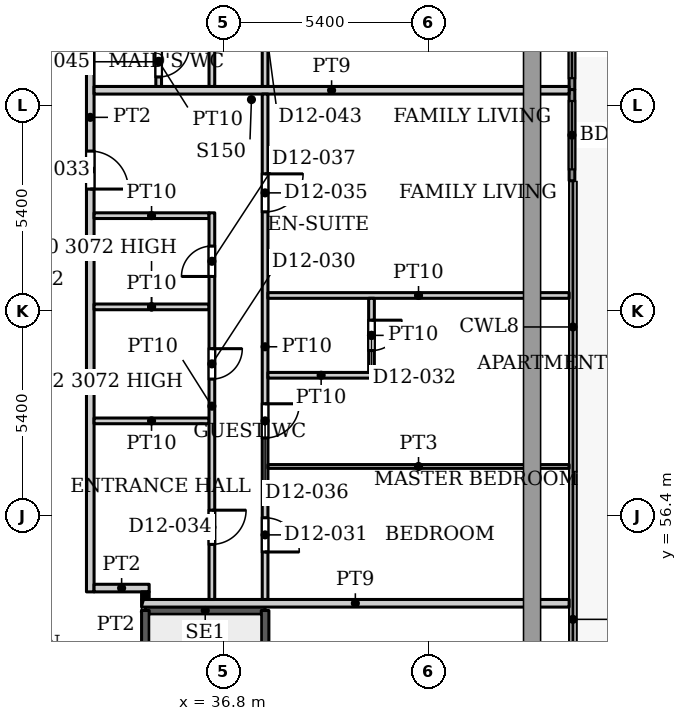
"""IFC4 building model, lengths in metres.
Left out: names, types, materials, properties, quantities, classifications, styles, units other than length and angle.
Written with IfcOpenShell. Run it as: python <this file> out.ifc"""

import sys

from ifc_helpers import new_model, si_unit, direction, frame, frame_2d, origin, place, context, subcontext, project, spatial, rectangle, extrude, source, transform, mapped, element, fill, save


model = new_model("IFC4")
c1 = context("Model", 3, precision=1e-05, world=origin(), true_north=direction((0.0, 1.0)))
c2 = subcontext(c1, "Body", "Model", "MODEL_VIEW")
j1 = project(units=[si_unit("LENGTHUNIT", "METRE"), si_unit("PLANEANGLEUNIT", "RADIAN")], contexts=[c1])
p1 = place(None, origin())
s1 = spatial("IfcSite", under=j1, at=p1, CompositionType="ELEMENT")
p2 = place(p1, origin())
s2 = spatial("IfcBuilding", under=s1, at=p2, CompositionType="ELEMENT")
p3 = place(p2, frame((0.0, 0.0, 53.9)))
s3 = spatial("IfcBuildingStorey", under=s2, at=p3, CompositionType="ELEMENT", Elevation=53.9)
p4 = place(p3, frame((45.975, 70.018, 0.0), z_axis=(0.0, 0.0, 1.0), x_axis=(0.0, -1.0, 0.0)))
e1 = element("IfcWall", 1, at=p4, inside=s3, PredefinedType="SOLIDWALL", context=c2, shape_type="SweptSolid", body=[
    extrude(rectangle(XDim=2.4, YDim=0.15, at=frame_2d((1.2, 0.0))), origin(), (0.0, 0.0, 1.0), 3.75),
])
p5 = place(p4, frame((0.3, 0.0, 0.0)))
e2 = element("IfcOpeningElement", 2, at=p5, cuts=e1, PredefinedType="OPENING", context=c2, shape_type="SweptSolid", body=[
    extrude(rectangle(XDim=1.8, YDim=2.4, at=frame_2d((0.9, 1.2))), frame((0.0, 0.085, 0.0), z_axis=(0.0, -1.0, 0.0), x_axis=(1.0, 0.0, 0.0)), (0.0, 0.0, 1.0), 0.17),
])
p6 = place(p3, frame((45.975, 67.618, 0.0), z_axis=(0.0, 0.0, 1.0), x_axis=(0.0, -1.0, 0.0)))
e3 = element("IfcWall", 3, at=p6, inside=s3, PredefinedType="SOLIDWALL", context=c2, shape_type="SweptSolid", body=[
    extrude(rectangle(XDim=2.4, YDim=0.15, at=frame_2d((1.2, 0.0))), origin(), (0.0, 0.0, 1.0), 3.75),
])
p7 = place(p6, frame((0.3, 0.0, 0.0)))
e4 = element("IfcOpeningElement", 4, at=p7, cuts=e3, PredefinedType="OPENING", context=c2, shape_type="SweptSolid", body=[
    extrude(rectangle(XDim=1.8, YDim=2.4, at=frame_2d((0.9, 1.2))), frame((0.0, 0.085, 0.0), z_axis=(0.0, -1.0, 0.0), x_axis=(1.0, 0.0, 0.0)), (0.0, 0.0, 1.0), 0.17),
])
p8 = place(p3, frame((34.75, 53.91, 0.0), z_axis=(0.0, 0.0, 1.0), x_axis=(1.0, 0.0, 0.0)))
e5 = element("IfcWall", 5, at=p8, inside=s3, PredefinedType="SHEAR", context=c2, shape_type="SweptSolid", body=[
    extrude(rectangle(XDim=3.15, YDim=0.2, at=frame_2d((1.575, 0.0))), origin(), (0.0, 0.0, 1.0), 3.9),
])
p9 = place(p3, frame((34.75, 47.5, 0.0), z_axis=(0.0, 0.0, 1.0), x_axis=(0.0, 1.0, 0.0)))
e6 = element("IfcWall", 6, at=p9, inside=s3, PredefinedType="SHEAR", context=c2, shape_type="SweptSolid", body=[
    extrude(rectangle(XDim=6.41, YDim=0.2, at=frame_2d((3.205, 0.0))), origin(), (0.0, 0.0, 1.0), 3.9),
])
p10 = place(p3, frame((37.9, 44.75, 0.0), z_axis=(0.0, 0.0, 1.0), x_axis=(0.0, 1.0, 0.0)))
e7 = element("IfcWall", 7, at=p10, inside=s3, PredefinedType="SHEAR", context=c2, shape_type="SweptSolid", body=[
    extrude(rectangle(XDim=9.16, YDim=0.2, at=frame_2d((4.58, 0.0))), origin(), (0.0, 0.0, 1.0), 3.9),
])
p11 = place(p3, frame((33.3, 54.4, 0.0), z_axis=(0.0, 0.0, 1.0), x_axis=(0.0, 1.0, 0.0)))
e8 = element("IfcWall", 8, at=p11, inside=s3, PredefinedType="PARTITIONING", context=c2, shape_type="SweptSolid", body=[
    extrude(rectangle(XDim=24.975, YDim=0.2, at=frame_2d((12.488, 0.0))), origin(), (0.0, 0.0, 1.0), 3.6),
])
p12 = place(p11, frame((10.6, 0.0, 0.0)))
e9 = element("IfcOpeningElement", 9, at=p12, cuts=e8, PredefinedType="OPENING", context=c2, shape_type="SweptSolid", body=[
    extrude(rectangle(XDim=1.0, YDim=2.1, at=frame_2d((0.5, 1.05))), frame((0.0, 0.11, 0.0), z_axis=(0.0, -1.0, 0.0), x_axis=(1.0, 0.0, 0.0)), (0.0, 0.0, 1.0), 0.22),
])
p13 = place(p11, frame((22.0, 0.0, 0.0)))
e10 = element("IfcOpeningElement", 10, at=p13, cuts=e8, PredefinedType="OPENING", context=c2, shape_type="SweptSolid", body=[
    extrude(rectangle(XDim=1.0, YDim=2.1, at=frame_2d((0.5, 1.05))), frame((0.0, 0.11, 0.0), z_axis=(0.0, -1.0, 0.0), x_axis=(1.0, 0.0, 0.0)), (0.0, 0.0, 1.0), 0.22),
])
p14 = place(p3, frame((33.4, 54.5, 0.0), z_axis=(0.0, 0.0, 1.0), x_axis=(1.0, 0.0, 0.0)))
e11 = element("IfcWall", 11, at=p14, inside=s3, PredefinedType="PARTITIONING", context=c2, shape_type="SweptSolid", body=[
    extrude(rectangle(XDim=1.45, YDim=0.2, at=frame_2d((0.725, 0.0))), origin(), (0.0, 0.0, 1.0), 3.6),
])
p15 = place(p3, frame((33.4, 58.9, 0.0), z_axis=(0.0, 0.0, 1.0), x_axis=(1.0, 0.0, 0.0)))
e12 = element("IfcWall", 12, at=p15, inside=s3, PredefinedType="PARTITIONING", context=c2, shape_type="SweptSolid", body=[
    extrude(rectangle(XDim=3.025, YDim=0.15, at=frame_2d((1.513, 0.0))), origin(), (0.0, 0.0, 1.0), 3.6),
])
p16 = place(p3, frame((33.4, 61.9, 0.0), z_axis=(0.0, 0.0, 1.0), x_axis=(1.0, 0.0, 0.0)))
e13 = element("IfcWall", 13, at=p16, inside=s3, PredefinedType="PARTITIONING", context=c2, shape_type="SweptSolid", body=[
    extrude(rectangle(XDim=3.025, YDim=0.15, at=frame_2d((1.513, 0.0))), origin(), (0.0, 0.0, 1.0), 3.072),
])
p17 = place(p3, frame((33.4, 64.3, 0.0), z_axis=(0.0, 0.0, 1.0), x_axis=(1.0, 0.0, 0.0)))
e14 = element("IfcWall", 14, at=p17, inside=s3, PredefinedType="PARTITIONING", context=c2, shape_type="SweptSolid", body=[
    extrude(rectangle(XDim=3.025, YDim=0.15, at=frame_2d((1.513, 0.0))), origin(), (0.0, 0.0, 1.0), 3.6),
])
p18 = place(p3, frame((33.4, 67.6, 0.0), z_axis=(0.0, 0.0, 1.0), x_axis=(1.0, 0.0, 0.0)))
e15 = element("IfcWall", 15, at=p18, inside=s3, PredefinedType="PARTITIONING", context=c2, shape_type="SweptSolid", body=[
    extrude(rectangle(XDim=12.5, YDim=0.2, at=frame_2d((6.25, 0.0))), origin(), (0.0, 0.0, 1.0), 3.6),
])
p19 = place(p3, frame((34.65, 54.1, 0.0), z_axis=(0.0, 0.0, 1.0), x_axis=(1.0, 0.0, 0.0)))
e16 = element("IfcWall", 16, at=p19, inside=s3, PredefinedType="PARTITIONING", context=c2, shape_type="SweptSolid", body=[
    extrude(rectangle(XDim=11.25, YDim=0.2, at=frame_2d((5.625, 0.0))), origin(), (0.0, 0.0, 1.0), 3.6),
])
p20 = place(p3, frame((34.75, 54.2, 0.0), z_axis=(0.0, 0.0, 1.0), x_axis=(0.0, 1.0, 0.0)))
e17 = element("IfcWall", 17, at=p20, inside=s3, PredefinedType="PARTITIONING", context=c2, shape_type="SweptSolid", body=[
    extrude(rectangle(XDim=0.2, YDim=0.2, at=frame_2d((0.1, 0.0))), origin(), (0.0, 0.0, 1.0), 3.6),
])
p21 = place(p3, frame((35.1, 67.7, 0.0), z_axis=(0.0, 0.0, 1.0), x_axis=(0.0, 1.0, 0.0)))
e18 = element("IfcWall", 18, at=p21, inside=s3, PredefinedType="PARTITIONING", context=c2, shape_type="SweptSolid", body=[
    extrude(rectangle(XDim=1.325, YDim=0.15, at=frame_2d((0.663, 0.0))), origin(), (0.0, 0.0, 1.0), 3.6),
])
p22 = place(p21, frame((0.25, 0.0, 0.0)))
e19 = element("IfcOpeningElement", 19, at=p22, cuts=e18, PredefinedType="OPENING", context=c2, shape_type="SweptSolid", body=[
    extrude(rectangle(XDim=0.8, YDim=2.1, at=frame_2d((0.4, 1.05))), frame((0.0, 0.085, 0.0), z_axis=(0.0, -1.0, 0.0), x_axis=(1.0, 0.0, 0.0)), (0.0, 0.0, 1.0), 0.17),
])
p23 = place(p3, frame((36.5, 54.2, 0.0), z_axis=(0.0, 0.0, 1.0), x_axis=(0.0, 1.0, 0.0)))
e20 = element("IfcWall", 20, at=p23, inside=s3, PredefinedType="PARTITIONING", context=c2, shape_type="SweptSolid", body=[
    extrude(rectangle(XDim=10.175, YDim=0.15, at=frame_2d((5.087, 0.0))), origin(), (0.0, 0.0, 1.0), 3.6),
])
p24 = place(p23, frame((5.8, 0.0, 0.0)))
e21 = element("IfcOpeningElement", 21, at=p24, cuts=e20, PredefinedType="OPENING", context=c2, shape_type="SweptSolid", body=[
    extrude(rectangle(XDim=0.8, YDim=2.1, at=frame_2d((0.4, 1.05))), frame((0.0, 0.085, 0.0), z_axis=(0.0, -1.0, 0.0), x_axis=(1.0, 0.0, 0.0)), (0.0, 0.0, 1.0), 0.17),
])
p25 = place(p23, frame((1.45, 0.0, 0.0)))
e22 = element("IfcOpeningElement", 22, at=p25, cuts=e20, PredefinedType="OPENING", context=c2, shape_type="SweptSolid", body=[
    extrude(rectangle(XDim=0.9, YDim=2.1, at=frame_2d((0.45, 1.05))), frame((0.0, 0.085, 0.0), z_axis=(0.0, -1.0, 0.0), x_axis=(1.0, 0.0, 0.0)), (0.0, 0.0, 1.0), 0.17),
])
p26 = place(p23, frame((8.5, 0.0, 0.0)))
e23 = element("IfcOpeningElement", 23, at=p26, cuts=e20, PredefinedType="OPENING", context=c2, shape_type="SweptSolid", body=[
    extrude(rectangle(XDim=0.8, YDim=2.1, at=frame_2d((0.4, 1.05))), frame((0.0, 0.085, 0.0), z_axis=(0.0, -1.0, 0.0), x_axis=(1.0, 0.0, 0.0)), (0.0, 0.0, 1.0), 0.17),
])
p27 = place(p3, frame((36.5, 67.7, 0.0), z_axis=(0.0, 0.0, 1.0), x_axis=(0.0, 1.0, 0.0)))
e24 = element("IfcWall", 24, at=p27, inside=s3, PredefinedType="PARTITIONING", context=c2, shape_type="SweptSolid", body=[
    extrude(rectangle(XDim=8.375, YDim=0.15, at=frame_2d((4.188, 0.0))), origin(), (0.0, 0.0, 1.0), 3.6),
])
p28 = place(p27, frame((6.85, 0.0, 0.0)))
e25 = element("IfcOpeningElement", 25, at=p28, cuts=e24, PredefinedType="OPENING", context=c2, shape_type="SweptSolid", body=[
    extrude(rectangle(XDim=0.8, YDim=2.1, at=frame_2d((0.4, 1.05))), frame((0.0, 0.085, 0.0), z_axis=(0.0, -1.0, 0.0), x_axis=(1.0, 0.0, 0.0)), (0.0, 0.0, 1.0), 0.17),
])
p29 = place(p27, frame((4.25, 0.0, 0.0)))
e26 = element("IfcOpeningElement", 26, at=p29, cuts=e24, PredefinedType="OPENING", context=c2, shape_type="SweptSolid", body=[
    extrude(rectangle(XDim=0.9, YDim=2.1, at=frame_2d((0.45, 1.05))), frame((0.0, 0.085, 0.0), z_axis=(0.0, -1.0, 0.0), x_axis=(1.0, 0.0, 0.0)), (0.0, 0.0, 1.0), 0.17),
])
p30 = place(p27, frame((1.9, 0.0, 0.0)))
e27 = element("IfcOpeningElement", 27, at=p30, cuts=e24, PredefinedType="OPENING", context=c2, shape_type="SweptSolid", body=[
    extrude(rectangle(XDim=0.8, YDim=2.1, at=frame_2d((0.4, 1.05))), frame((0.0, 0.085, 0.0), z_axis=(0.0, -1.0, 0.0), x_axis=(1.0, 0.0, 0.0)), (0.0, 0.0, 1.0), 0.17),
])
p31 = place(p3, frame((37.9, 54.2, 0.0), z_axis=(0.0, 0.0, 1.0), x_axis=(0.0, 1.0, 0.0)))
e28 = element("IfcWall", 28, at=p31, inside=s3, PredefinedType="PARTITIONING", context=c2, shape_type="SweptSolid", body=[
    extrude(rectangle(XDim=13.3, YDim=0.15, at=frame_2d((6.65, 0.0))), origin(), (0.0, 0.0, 1.0), 3.6),
])
p32 = place(p31, frame((1.25, 0.0, 0.0)))
e29 = element("IfcOpeningElement", 29, at=p32, cuts=e28, PredefinedType="OPENING", context=c2, shape_type="SweptSolid", body=[
    extrude(rectangle(XDim=0.9, YDim=2.1, at=frame_2d((0.45, 1.05))), frame((0.0, 0.085, 0.0), z_axis=(0.0, -1.0, 0.0), x_axis=(1.0, 0.0, 0.0)), (0.0, 0.0, 1.0), 0.17),
])
p33 = place(p31, frame((10.2, 0.0, 0.0)))
e30 = element("IfcOpeningElement", 30, at=p33, cuts=e28, PredefinedType="OPENING", context=c2, shape_type="SweptSolid", body=[
    extrude(rectangle(XDim=1.0, YDim=2.1, at=frame_2d((0.5, 1.05))), frame((0.0, 0.085, 0.0), z_axis=(0.0, -1.0, 0.0), x_axis=(1.0, 0.0, 0.0)), (0.0, 0.0, 1.0), 0.17),
])
p34 = place(p31, frame((4.25, 0.0, 0.0)))
e31 = element("IfcOpeningElement", 31, at=p34, cuts=e28, PredefinedType="OPENING", context=c2, shape_type="SweptSolid", body=[
    extrude(rectangle(XDim=0.9, YDim=2.1, at=frame_2d((0.45, 1.05))), frame((0.0, 0.085, 0.0), z_axis=(0.0, -1.0, 0.0), x_axis=(1.0, 0.0, 0.0)), (0.0, 0.0, 1.0), 0.17),
])
p35 = place(p3, frame((37.9, 67.7, 0.0), z_axis=(0.0, 0.0, 1.0), x_axis=(0.0, 1.0, 0.0)))
e32 = element("IfcWall", 32, at=p35, inside=s3, PredefinedType="PARTITIONING", context=c2, shape_type="SweptSolid", body=[
    extrude(rectangle(XDim=11.525, YDim=0.15, at=frame_2d((5.763, 0.0))), origin(), (0.0, 0.0, 1.0), 3.6),
])
p36 = place(p35, frame((9.35, 0.0, 0.0)))
e33 = element("IfcOpeningElement", 33, at=p36, cuts=e32, PredefinedType="OPENING", context=c2, shape_type="SweptSolid", body=[
    extrude(rectangle(XDim=0.9, YDim=2.1, at=frame_2d((0.45, 1.05))), frame((0.0, 0.085, 0.0), z_axis=(0.0, -1.0, 0.0), x_axis=(1.0, 0.0, 0.0)), (0.0, 0.0, 1.0), 0.17),
])
p37 = place(p35, frame((1.2, 0.0, 0.0)))
e34 = element("IfcOpeningElement", 34, at=p37, cuts=e32, PredefinedType="OPENING", context=c2, shape_type="SweptSolid", body=[
    extrude(rectangle(XDim=1.0, YDim=2.1, at=frame_2d((0.5, 1.05))), frame((0.0, 0.085, 0.0), z_axis=(0.0, -1.0, 0.0), x_axis=(1.0, 0.0, 0.0)), (0.0, 0.0, 1.0), 0.17),
])
p38 = place(p35, frame((6.35, 0.0, 0.0)))
e35 = element("IfcOpeningElement", 35, at=p38, cuts=e32, PredefinedType="OPENING", context=c2, shape_type="SweptSolid", body=[
    extrude(rectangle(XDim=0.9, YDim=2.1, at=frame_2d((0.45, 1.05))), frame((0.0, 0.085, 0.0), z_axis=(0.0, -1.0, 0.0), x_axis=(1.0, 0.0, 0.0)), (0.0, 0.0, 1.0), 0.17),
])
p39 = place(p3, frame((37.975, 57.7, 0.0), z_axis=(0.0, 0.0, 1.0), x_axis=(1.0, 0.0, 0.0)))
e36 = element("IfcWall", 36, at=p39, inside=s3, PredefinedType="PARTITIONING", context=c2, shape_type="SweptSolid", body=[
    extrude(rectangle(XDim=7.925, YDim=0.1, at=frame_2d((3.962, 0.0))), origin(), (0.0, 0.0, 1.0), 3.6),
])
p40 = place(p3, frame((37.975, 60.1, 0.0), z_axis=(0.0, 0.0, 1.0), x_axis=(1.0, 0.0, 0.0)))
e37 = element("IfcWall", 37, at=p40, inside=s3, PredefinedType="PARTITIONING", context=c2, shape_type="SweptSolid", body=[
    extrude(rectangle(XDim=2.8, YDim=0.15, at=frame_2d((1.4, 0.0))), origin(), (0.0, 0.0, 1.0), 3.6),
])
p41 = place(p3, frame((37.975, 62.2, 0.0), z_axis=(0.0, 0.0, 1.0), x_axis=(1.0, 0.0, 0.0)))
e38 = element("IfcWall", 38, at=p41, inside=s3, PredefinedType="PARTITIONING", context=c2, shape_type="SweptSolid", body=[
    extrude(rectangle(XDim=7.925, YDim=0.15, at=frame_2d((3.962, 0.0))), origin(), (0.0, 0.0, 1.0), 3.6),
])
p42 = place(p3, frame((40.7, 60.175, 0.0), z_axis=(0.0, 0.0, 1.0), x_axis=(0.0, 1.0, 0.0)))
e39 = element("IfcWall", 39, at=p42, inside=s3, PredefinedType="PARTITIONING", context=c2, shape_type="SweptSolid", body=[
    extrude(rectangle(XDim=1.95, YDim=0.15, at=frame_2d((0.975, 0.0))), origin(), (0.0, 0.0, 1.0), 3.6),
])
p43 = place(p42, frame((0.575, 0.0, 0.0)))
e40 = element("IfcOpeningElement", 40, at=p43, cuts=e39, PredefinedType="OPENING", context=c2, shape_type="SweptSolid", body=[
    extrude(rectangle(XDim=0.8, YDim=2.1, at=frame_2d((0.4, 1.05))), frame((0.0, 0.085, 0.0), z_axis=(0.0, -1.0, 0.0), x_axis=(1.0, 0.0, 0.0)), (0.0, 0.0, 1.0), 0.17),
])
m1 = source(origin(), c2, "Body", "SweptSolid", [
    extrude(rectangle(XDim=1.8, YDim=2.4, at=frame_2d((0.9, 1.2))), frame((0.0, 0.025, 0.0), z_axis=(0.0, -1.0, 0.0), x_axis=(1.0, 0.0, 0.0)), (0.0, 0.0, 1.0), 0.05),
])
p44 = place(p5, origin())
e41 = element("IfcDoor", 41, at=p44, inside=s3, OperationType="SLIDING_TO_LEFT", PredefinedType="DOOR", context=c2, shape_type="MappedRepresentation", body=[
    mapped(m1, transform((0.0, 0.0, 0.0), x_axis=(1.0, 0.0, 0.0), y_axis=(0.0, 1.0, 0.0), z_axis=(0.0, 0.0, 1.0), scale=1.0)),
])
fill(e2, e41)
p45 = place(p7, origin())
e42 = element("IfcDoor", 42, at=p45, inside=s3, OperationType="SLIDING_TO_LEFT", PredefinedType="DOOR", context=c2, shape_type="MappedRepresentation", body=[
    mapped(m1, transform((0.0, 0.0, 0.0), x_axis=(1.0, 0.0, 0.0), y_axis=(0.0, 1.0, 0.0), z_axis=(0.0, 0.0, 1.0), scale=1.0)),
])
fill(e4, e42)
m2 = source(origin(), c2, "Body", "SweptSolid", [
    extrude(rectangle(XDim=0.8, YDim=2.1, at=frame_2d((0.4, 1.05))), frame((0.0, 0.025, 0.0), z_axis=(0.0, -1.0, 0.0), x_axis=(1.0, 0.0, 0.0)), (0.0, 0.0, 1.0), 0.05),
])
p46 = place(p24, origin())
e43 = element("IfcDoor", 43, at=p46, inside=s3, OperationType="SINGLE_SWING_RIGHT", PredefinedType="DOOR", context=c2, shape_type="MappedRepresentation", body=[
    mapped(m2, transform((0.0, 0.0, 0.0), x_axis=(1.0, 0.0, 0.0), y_axis=(0.0, 1.0, 0.0), z_axis=(0.0, 0.0, 1.0), scale=1.0)),
])
fill(e21, e43)
m3 = source(origin(), c2, "Body", "SweptSolid", [
    extrude(rectangle(XDim=0.9, YDim=2.1, at=frame_2d((0.45, 1.05))), frame((0.0, 0.025, 0.0), z_axis=(0.0, -1.0, 0.0), x_axis=(1.0, 0.0, 0.0)), (0.0, 0.0, 1.0), 0.05),
])
p47 = place(p32, origin())
e44 = element("IfcDoor", 44, at=p47, inside=s3, OperationType="SINGLE_SWING_RIGHT", PredefinedType="DOOR", context=c2, shape_type="MappedRepresentation", body=[
    mapped(m3, transform((0.0, 0.0, 0.0), x_axis=(1.0, 0.0, 0.0), y_axis=(0.0, 1.0, 0.0), z_axis=(0.0, 0.0, 1.0), scale=1.0)),
])
fill(e29, e44)
p48 = place(p43, origin())
e45 = element("IfcDoor", 45, at=p48, inside=s3, OperationType="SINGLE_SWING_RIGHT", PredefinedType="DOOR", context=c2, shape_type="MappedRepresentation", body=[
    mapped(m2, transform((0.0, 0.0, 0.0), x_axis=(1.0, 0.0, 0.0), y_axis=(0.0, 1.0, 0.0), z_axis=(0.0, 0.0, 1.0), scale=1.0)),
])
fill(e40, e45)
m4 = source(origin(), c2, "Body", "SweptSolid", [
    extrude(rectangle(XDim=1.0, YDim=2.1, at=frame_2d((0.5, 1.05))), frame((0.0, 0.025, 0.0), z_axis=(0.0, -1.0, 0.0), x_axis=(1.0, 0.0, 0.0)), (0.0, 0.0, 1.0), 0.05),
])
p49 = place(p12, origin())
e46 = element("IfcDoor", 46, at=p49, inside=s3, OperationType="SINGLE_SWING_RIGHT", PredefinedType="DOOR", context=c2, shape_type="MappedRepresentation", body=[
    mapped(m4, transform((0.0, 0.0, 0.0), x_axis=(1.0, 0.0, 0.0), y_axis=(0.0, 1.0, 0.0), z_axis=(0.0, 0.0, 1.0), scale=1.0)),
])
fill(e9, e46)
p50 = place(p25, origin())
e47 = element("IfcDoor", 47, at=p50, inside=s3, OperationType="SINGLE_SWING_RIGHT", PredefinedType="DOOR", context=c2, shape_type="MappedRepresentation", body=[
    mapped(m3, transform((0.0, 0.0, 0.0), x_axis=(1.0, 0.0, 0.0), y_axis=(0.0, 1.0, 0.0), z_axis=(0.0, 0.0, 1.0), scale=1.0)),
])
fill(e22, e47)
m5 = source(origin(), c2, "Body", "SweptSolid", [
    extrude(rectangle(XDim=1.0, YDim=2.1, at=frame_2d((0.5, 1.05))), frame((0.0, 0.025, 0.0), z_axis=(0.0, -1.0, 0.0), x_axis=(1.0, 0.0, 0.0)), (0.0, 0.0, 1.0), 0.05),
])
p51 = place(p33, origin())
e48 = element("IfcDoor", 48, at=p51, inside=s3, OperationType="SINGLE_SWING_RIGHT", PredefinedType="DOOR", context=c2, shape_type="MappedRepresentation", body=[
    mapped(m5, transform((0.0, 0.0, 0.0), x_axis=(1.0, 0.0, 0.0), y_axis=(0.0, 1.0, 0.0), z_axis=(0.0, 0.0, 1.0), scale=1.0)),
])
fill(e30, e48)
p52 = place(p34, origin())
e49 = element("IfcDoor", 49, at=p52, inside=s3, OperationType="SINGLE_SWING_RIGHT", PredefinedType="DOOR", context=c2, shape_type="MappedRepresentation", body=[
    mapped(m3, transform((0.0, 0.0, 0.0), x_axis=(1.0, 0.0, 0.0), y_axis=(0.0, 1.0, 0.0), z_axis=(0.0, 0.0, 1.0), scale=1.0)),
])
fill(e31, e49)
p53 = place(p26, origin())
e50 = element("IfcDoor", 50, at=p53, inside=s3, OperationType="SINGLE_SWING_LEFT", PredefinedType="DOOR", context=c2, shape_type="MappedRepresentation", body=[
    mapped(m2, transform((0.0, 0.0, 0.0), x_axis=(1.0, 0.0, 0.0), y_axis=(0.0, 1.0, 0.0), z_axis=(0.0, 0.0, 1.0), scale=1.0)),
])
fill(e23, e50)
p54 = place(p22, origin())
e51 = element("IfcDoor", 51, at=p54, inside=s3, OperationType="SINGLE_SWING_RIGHT", PredefinedType="DOOR", context=c2, shape_type="MappedRepresentation", body=[
    mapped(m2, transform((0.0, 0.0, 0.0), x_axis=(1.0, 0.0, 0.0), y_axis=(0.0, 1.0, 0.0), z_axis=(0.0, 0.0, 1.0), scale=1.0)),
])
fill(e19, e51)
save(model, sys.argv[1])
